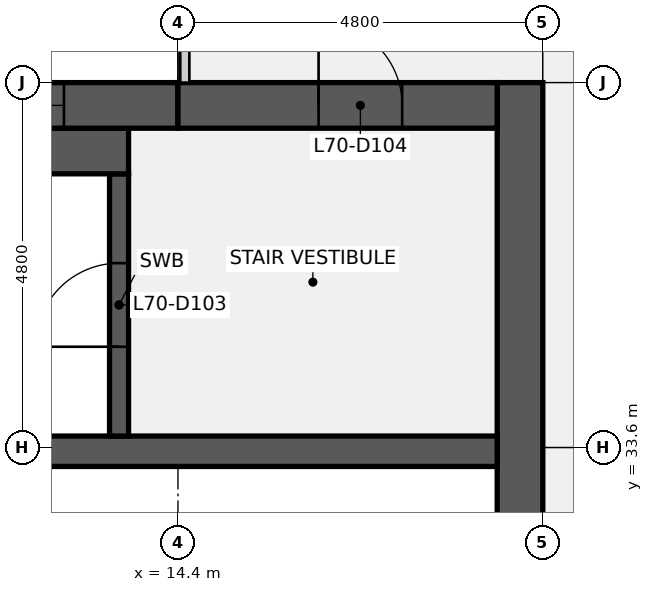
"""IFC4 building model, lengths in metres.
Left out: names, types, materials, properties, quantities, classifications, styles, units other than length and angle.
Written with IfcOpenShell. Run it as: python <this file> out.ifc"""

import sys

from ifc_helpers import new_model, si_unit, direction, frame, frame_2d, origin, place, context, subcontext, project, spatial, rectangle, extrude, element, fill, save


model = new_model("IFC4")
c1 = context("Model", 3, precision=1e-05, world=origin(), true_north=direction((0.0, 1.0)))
c2 = subcontext(c1, "Body", "Model", "MODEL_VIEW")
j1 = project(units=[si_unit("LENGTHUNIT", "METRE"), si_unit("PLANEANGLEUNIT", "RADIAN")], contexts=[c1])
p1 = place(None, origin())
s1 = spatial("IfcSite", under=j1, at=p1, CompositionType="ELEMENT")
p2 = place(p1, origin())
s2 = spatial("IfcBuilding", under=s1, at=p2, CompositionType="ELEMENT")
p3 = place(p2, frame((0.0, 0.0, 318.3)))
s3 = spatial("IfcBuildingStorey", under=s2, at=p3, CompositionType="ELEMENT", Elevation=318.3)
p4 = place(p3, frame((18.9, 38.4, 0.0), z_axis=(0.0, 0.0, 1.0), x_axis=(0.0, -1.0, 0.0)))
e1 = element("IfcWall", 1, at=p4, inside=s3, PredefinedType="SHEAR", context=c2, shape_type="SweptSolid", body=[
    extrude(rectangle(XDim=28.8, YDim=0.6, at=frame_2d((14.4, 0.0))), origin(), (0.0, 0.0, 1.0), 3.84),
])
p5 = place(p4, frame((18.3, 0.0, 0.0)))
e2 = element("IfcOpeningElement", 2, at=p5, cuts=e1, PredefinedType="OPENING", context=c2, shape_type="SweptSolid", body=[
    extrude(rectangle(XDim=1.8, YDim=2.1, at=frame_2d((0.9, 1.05))), frame((0.0, 0.31, 0.0), z_axis=(0.0, -1.0, 0.0), x_axis=(1.0, 0.0, 0.0)), (0.0, 0.0, 1.0), 0.62),
])
p6 = place(p4, frame((8.7, 0.0, 0.0)))
e3 = element("IfcOpeningElement", 3, at=p6, cuts=e1, PredefinedType="OPENING", context=c2, shape_type="SweptSolid", body=[
    extrude(rectangle(XDim=1.8, YDim=2.1, at=frame_2d((0.9, 1.05))), frame((0.0, 0.31, 0.0), z_axis=(0.0, -1.0, 0.0), x_axis=(1.0, 0.0, 0.0)), (0.0, 0.0, 1.0), 0.62),
])
p7 = place(p3, frame((0.6, 33.55, 0.0), z_axis=(0.0, 0.0, 1.0), x_axis=(1.0, 0.0, 0.0)))
e4 = element("IfcWall", 4, at=p7, inside=s3, PredefinedType="SHEAR", context=c2, shape_type="SweptSolid", body=[
    extrude(rectangle(XDim=18.0, YDim=0.4, at=frame_2d((9.0, 0.0))), origin(), (0.0, 0.0, 1.0), 3.84),
])
p8 = place(p3, frame((13.625, 33.75, 0.0), z_axis=(0.0, 0.0, 1.0), x_axis=(0.0, 1.0, 0.0)))
e5 = element("IfcWall", 5, at=p8, inside=s3, PredefinedType="SHEAR", context=c2, shape_type="SweptSolid", body=[
    extrude(rectangle(XDim=3.45, YDim=0.25, at=frame_2d((1.725, 0.0))), origin(), (0.0, 0.0, 1.0), 3.84),
])
p9 = place(p8, frame((1.175, 0.0, 0.0)))
e6 = element("IfcOpeningElement", 6, at=p9, cuts=e5, PredefinedType="OPENING", context=c2, shape_type="SweptSolid", body=[
    extrude(rectangle(XDim=1.1, YDim=2.1, at=frame_2d((0.55, 1.05))), frame((0.0, 0.135, 0.0), z_axis=(0.0, -1.0, 0.0), x_axis=(1.0, 0.0, 0.0)), (0.0, 0.0, 1.0), 0.27),
])
p10 = place(p3, frame((6.25, 37.5, 0.0), z_axis=(0.0, 0.0, 1.0), x_axis=(1.0, 0.0, 0.0)))
e7 = element("IfcWall", 7, at=p10, inside=s3, PredefinedType="SHEAR", context=c2, shape_type="SweptSolid", body=[
    extrude(rectangle(XDim=7.5, YDim=0.6, at=frame_2d((3.75, 0.0))), origin(), (0.0, 0.0, 1.0), 3.84),
])
p11 = place(p3, frame((0.6, 38.1, 0.0), z_axis=(0.0, 0.0, 1.0), x_axis=(1.0, 0.0, 0.0)))
e8 = element("IfcWall", 8, at=p11, inside=s3, PredefinedType="SHEAR", context=c2, shape_type="SweptSolid", body=[
    extrude(rectangle(XDim=13.8, YDim=0.6, at=frame_2d((6.9, 0.0))), origin(), (0.0, 0.0, 1.0), 3.84),
])
p12 = place(p11, frame((5.7, 0.0, 0.9)))
e9 = element("IfcOpeningElement", 9, at=p12, cuts=e8, PredefinedType="OPENING", context=c2, shape_type="SweptSolid", body=[
    extrude(rectangle(XDim=1.8, YDim=1.5, at=frame_2d((0.9, 0.75))), frame((0.0, 0.31, 0.0), z_axis=(0.0, -1.0, 0.0), x_axis=(1.0, 0.0, 0.0)), (0.0, 0.0, 1.0), 0.62),
])
p13 = place(p11, frame((10.5, 0.0, 0.9)))
e10 = element("IfcOpeningElement", 10, at=p13, cuts=e8, PredefinedType="OPENING", context=c2, shape_type="SweptSolid", body=[
    extrude(rectangle(XDim=1.8, YDim=1.5, at=frame_2d((0.9, 0.75))), frame((0.0, 0.31, 0.0), z_axis=(0.0, -1.0, 0.0), x_axis=(1.0, 0.0, 0.0)), (0.0, 0.0, 1.0), 0.62),
])
p14 = place(p3, frame((14.4, 38.1, 0.0), z_axis=(0.0, 0.0, 1.0), x_axis=(1.0, 0.0, 0.0)))
e11 = element("IfcWall", 11, at=p14, inside=s3, PredefinedType="SHEAR", context=c2, shape_type="SweptSolid", body=[
    extrude(rectangle(XDim=4.2, YDim=0.6, at=frame_2d((2.1, 0.0))), origin(), (0.0, 0.0, 1.0), 3.84),
])
p15 = place(p14, frame((1.85, 0.0, 0.0)))
e12 = element("IfcOpeningElement", 12, at=p15, cuts=e11, PredefinedType="OPENING", context=c2, shape_type="SweptSolid", body=[
    extrude(rectangle(XDim=1.1, YDim=2.1, at=frame_2d((0.55, 1.05))), frame((0.0, 0.31, 0.0), z_axis=(0.0, -1.0, 0.0), x_axis=(1.0, 0.0, 0.0)), (0.0, 0.0, 1.0), 0.62),
])
p16 = place(p9, origin())
e13 = element("IfcDoor", 13, at=p16, inside=s3, OperationType="SINGLE_SWING_LEFT", PredefinedType="DOOR", context=c2, shape_type="SweptSolid", body=[
    extrude(rectangle(XDim=1.1, YDim=2.1, at=frame_2d((0.55, 1.05))), frame((0.0, 0.025, 0.0), z_axis=(0.0, -1.0, 0.0), x_axis=(1.0, 0.0, 0.0)), (0.0, 0.0, 1.0), 0.05),
])
fill(e6, e13)
p17 = place(p15, origin())
e14 = element("IfcDoor", 14, at=p17, inside=s3, OperationType="SINGLE_SWING_LEFT", PredefinedType="DOOR", context=c2, shape_type="SweptSolid", body=[
    extrude(rectangle(XDim=1.1, YDim=2.1, at=frame_2d((0.55, 1.05))), frame((0.0, 0.025, 0.0), z_axis=(0.0, -1.0, 0.0), x_axis=(1.0, 0.0, 0.0)), (0.0, 0.0, 1.0), 0.05),
])
fill(e12, e14)
p18 = place(p13, origin())
e15 = element("IfcWindow", 15, at=p18, inside=s3, PartitioningType="SINGLE_PANEL", PredefinedType="WINDOW", context=c2, shape_type="SweptSolid", body=[
    extrude(rectangle(XDim=1.8, YDim=1.5, at=frame_2d((0.9, 0.75))), frame((0.0, 0.03, 0.0), z_axis=(0.0, -1.0, 0.0), x_axis=(1.0, 0.0, 0.0)), (0.0, 0.0, 1.0), 0.06),
])
fill(e10, e15)
save(model, sys.argv[1])
